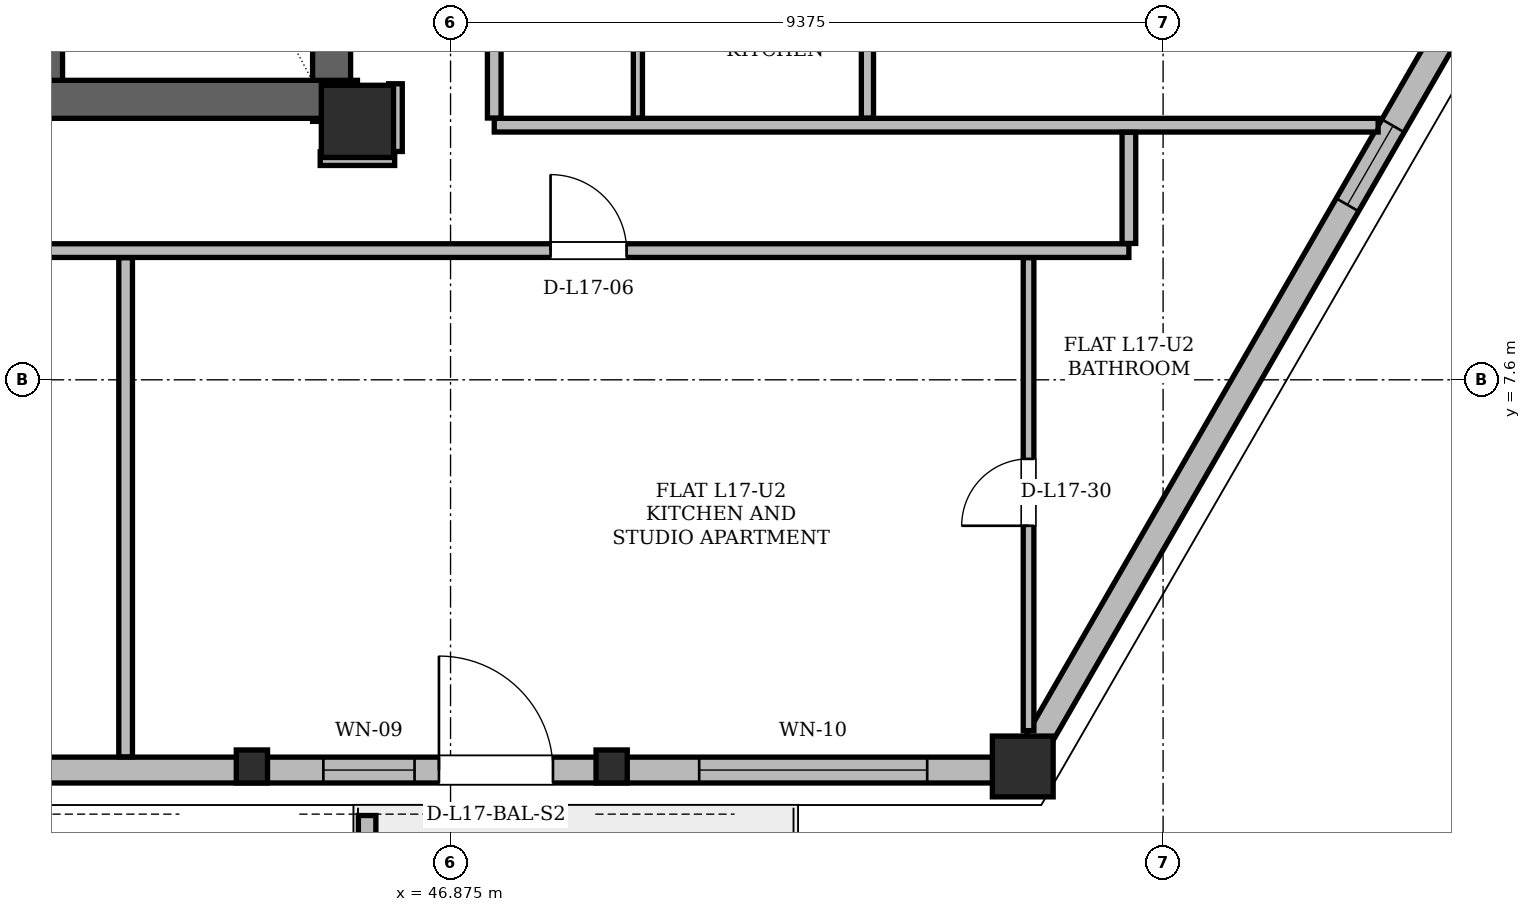
"""IFC4 building model, lengths in metres.
Left out: names, types, materials, properties, quantities, classifications, styles, units other than length and angle.
Written with IfcOpenShell. Run it as: python <this file> out.ifc"""

import sys

from ifc_helpers import new_model, si_unit, direction, frame, frame_2d, origin, origin_2d, place, context, subcontext, project, spatial, polyline, rectangle, hollow_rectangle, i_section, outline, extrude, element, fill, save


model = new_model("IFC4")
c1 = context("Model", 3, precision=1e-05, world=origin(), true_north=direction((0.0, 1.0)))
c2 = subcontext(c1, "Body", "Model", "MODEL_VIEW")
j1 = project(units=[si_unit("LENGTHUNIT", "METRE"), si_unit("PLANEANGLEUNIT", "RADIAN")], contexts=[c1])
p1 = place(None, origin())
s1 = spatial("IfcSite", under=j1, at=p1, CompositionType="ELEMENT")
p2 = place(p1, origin())
s2 = spatial("IfcBuilding", under=s1, at=p2, CompositionType="ELEMENT")
p3 = place(p2, frame((0.0, 0.0, 66.9)))
s3 = spatial("IfcBuildingStorey", under=s2, at=p3, CompositionType="ELEMENT", Elevation=66.9)
p4 = place(p3, frame((45.65, 11.0, 0.0), z_axis=(0.0, 0.0, 1.0), x_axis=(1.0, 0.0, 0.0)))
e1 = element("IfcColumn", 1, at=p4, inside=s3, PredefinedType="COLUMN", context=c2, shape_type="SweptSolid", body=[
    extrude(hollow_rectangle(XDim=0.95, YDim=0.95, WallThickness=0.08, at=origin_2d()), origin(), (0.0, 0.0, 1.0), 3.6),
])
p5 = place(p3, frame((54.382, 2.466, 0.005), z_axis=(0.01223223513, 0.026367262391, 0.999577480688), x_axis=(-0.907136496953, 0.420836519205, 0.0)))
e2 = element("IfcColumn", 2, at=p5, inside=s3, PredefinedType="COLUMN", context=c2, shape_type="SweptSolid", body=[
    extrude(hollow_rectangle(XDim=0.8, YDim=0.8, WallThickness=0.065, at=origin_2d()), origin(), (0.0, 0.0, 1.0), 3.593),
])
p6 = place(p3, frame((44.253, 2.466, 0.005), z_axis=(0.004893201568, 0.02636891956, 0.999640303639), x_axis=(-0.983214721584, 0.182452216376, 0.0)))
e3 = element("IfcColumn", 3, at=p6, inside=s3, PredefinedType="COLUMN", context=c2, shape_type="SweptSolid", body=[
    extrude(i_section(OverallWidth=0.411, OverallDepth=0.434, WebThickness=0.036, FlangeThickness=0.057, at=origin_2d()), origin(), (0.0, 0.0, 1.0), 3.592),
])
p7 = place(p3, frame((48.979, 2.466, 0.005), z_axis=(0.008359027369, 0.026368313978, 0.999617346128), x_axis=(-0.953247900316, 0.302189411698, 0.0)))
e4 = element("IfcColumn", 4, at=p7, inside=s3, PredefinedType="COLUMN", context=c2, shape_type="SweptSolid", body=[
    extrude(i_section(OverallWidth=0.411, OverallDepth=0.434, WebThickness=0.036, FlangeThickness=0.057, at=origin_2d()), origin(), (0.0, 0.0, 1.0), 3.593),
])
p8 = place(p3, frame((45.31, 11.0, 0.0), z_axis=(0.0, 0.0, 1.0), x_axis=(0.0, 1.0, 0.0)))
e5 = element("IfcWall", 5, at=p8, inside=s3, PredefinedType="SHEAR", context=c2, shape_type="SweptSolid", body=[
    extrude(rectangle(XDim=13.3, YDim=0.5, at=frame_2d((6.65, 0.0))), origin(), (0.0, 0.0, 1.0), 3.36),
])
p9 = place(p3, frame((38.55, 11.29, 0.0), z_axis=(0.0, 0.0, 1.0), x_axis=(1.0, 0.0, 0.0)))
e6 = element("IfcWall", 6, at=p9, inside=s3, PredefinedType="SHEAR", context=c2, shape_type="SweptSolid", body=[
    extrude(rectangle(XDim=7.1, YDim=0.5, at=frame_2d((3.55, 0.0))), origin(), (0.0, 0.0, 1.0), 3.36),
])
p10 = place(p3, frame((41.62, 11.54, 0.0), z_axis=(0.0, 0.0, 1.0), x_axis=(0.0, 1.0, 0.0)))
e7 = element("IfcWall", 7, at=p10, inside=s3, PredefinedType="SHEAR", context=c2, shape_type="SweptSolid", body=[
    extrude(rectangle(XDim=7.62, YDim=0.3, at=frame_2d((3.81, 0.0))), origin(), (0.0, 0.0, 1.0), 3.36),
])
p11 = place(p3, frame((20.618, 2.466, 0.0), z_axis=(0.0, 0.0, 1.0), x_axis=(1.0, 0.0, 0.0)))
e8 = element("IfcWall", 8, at=p11, inside=s3, PredefinedType="SOLIDWALL", context=c2, shape_type="SweptSolid", body=[
    extrude(rectangle(XDim=33.764, YDim=0.34, at=frame_2d((16.882, 0.0))), origin(), (0.0, 0.0, 1.0), 2.494),
])
p12 = place(p11, frame((7.824, 0.0, 0.0)))
e9 = element("IfcOpeningElement", 9, at=p12, cuts=e8, PredefinedType="OPENING", context=c2, shape_type="SweptSolid", body=[
    extrude(rectangle(XDim=1.5, YDim=2.2, at=frame_2d((0.75, 1.1))), frame((0.0, 0.17, 0.0), z_axis=(0.0, -1.0, 0.0), x_axis=(1.0, 0.0, 0.0)), (0.0, 0.0, 1.0), 0.34),
])
p13 = place(p11, frame((26.104, 0.0, 0.0)))
e10 = element("IfcOpeningElement", 10, at=p13, cuts=e8, PredefinedType="OPENING", context=c2, shape_type="SweptSolid", body=[
    extrude(rectangle(XDim=1.5, YDim=2.2, at=frame_2d((0.75, 1.1))), frame((0.0, 0.17, 0.0), z_axis=(0.0, -1.0, 0.0), x_axis=(1.0, 0.0, 0.0)), (0.0, 0.0, 1.0), 0.34),
])
p14 = place(p11, frame((11.402, 0.0, 0.85)))
e11 = element("IfcOpeningElement", 11, at=p14, cuts=e8, PredefinedType="OPENING", context=c2, shape_type="SweptSolid", body=[
    extrude(rectangle(XDim=2.0, YDim=1.534, at=frame_2d((1.0, 0.767))), frame((0.0, 0.17, 0.0), z_axis=(0.0, -1.0, 0.0), x_axis=(1.0, 0.0, 0.0)), (0.0, 0.0, 1.0), 0.34),
])
p15 = place(p11, frame((19.123, 0.0, 0.85)))
e12 = element("IfcOpeningElement", 12, at=p15, cuts=e8, PredefinedType="OPENING", context=c2, shape_type="SweptSolid", body=[
    extrude(rectangle(XDim=1.4, YDim=1.534, at=frame_2d((0.7, 0.767))), frame((0.0, 0.17, 0.0), z_axis=(0.0, -1.0, 0.0), x_axis=(1.0, 0.0, 0.0)), (0.0, 0.0, 1.0), 0.34),
])
p16 = place(p11, frame((24.583, 0.0, 0.85)))
e13 = element("IfcOpeningElement", 13, at=p16, cuts=e8, PredefinedType="OPENING", context=c2, shape_type="SweptSolid", body=[
    extrude(rectangle(XDim=1.2, YDim=1.48, at=frame_2d((0.6, 0.74))), frame((0.0, 0.17, 0.0), z_axis=(0.0, -1.0, 0.0), x_axis=(1.0, 0.0, 0.0)), (0.0, 0.0, 1.0), 0.34),
])
p17 = place(p11, frame((29.528, 0.0, 0.85)))
e14 = element("IfcOpeningElement", 14, at=p17, cuts=e8, PredefinedType="OPENING", context=c2, shape_type="SweptSolid", body=[
    extrude(rectangle(XDim=3.0, YDim=1.534, at=frame_2d((1.5, 0.767))), frame((0.0, 0.17, 0.0), z_axis=(0.0, -1.0, 0.0), x_axis=(1.0, 0.0, 0.0)), (0.0, 0.0, 1.0), 0.34),
])
p18 = place(p11, frame((0.989, 0.0, 0.85)))
e15 = element("IfcOpeningElement", 15, at=p18, cuts=e8, PredefinedType="OPENING", context=c2, shape_type="SweptSolid", body=[
    extrude(rectangle(XDim=1.2, YDim=1.48, at=frame_2d((0.6, 0.74))), frame((0.0, 0.17, 0.0), z_axis=(0.0, -1.0, 0.0), x_axis=(1.0, 0.0, 0.0)), (0.0, 0.0, 1.0), 0.34),
])
p19 = place(p11, frame((3.417, 0.0, 0.85)))
e16 = element("IfcOpeningElement", 16, at=p19, cuts=e8, PredefinedType="OPENING", context=c2, shape_type="SweptSolid", body=[
    extrude(rectangle(XDim=1.2, YDim=1.48, at=frame_2d((0.6, 0.74))), frame((0.0, 0.17, 0.0), z_axis=(0.0, -1.0, 0.0), x_axis=(1.0, 0.0, 0.0)), (0.0, 0.0, 1.0), 0.34),
])
p20 = place(p3, frame((54.382, 2.466, 0.0), z_axis=(0.0, 0.0, 1.0), x_axis=(0.499986980295, 0.866032920584, 0.0)))
e17 = element("IfcWall", 17, at=p20, inside=s3, PredefinedType="SOLIDWALL", context=c2, shape_type="SweptSolid", body=[
    extrude(rectangle(XDim=13.661, YDim=0.34, at=frame_2d((6.831, 0.0))), origin(), (0.0, 0.0, 1.0), 2.494),
])
p21 = place(p20, frame((8.587, 0.0, 0.85)))
e18 = element("IfcOpeningElement", 18, at=p21, cuts=e17, PredefinedType="OPENING", context=c2, shape_type="SweptSolid", body=[
    extrude(rectangle(XDim=1.2, YDim=1.48, at=frame_2d((0.6, 0.74))), frame((0.0, 0.17, 0.0), z_axis=(0.0, -1.0, 0.0), x_axis=(1.0, 0.0, 0.0)), (0.0, 0.0, 1.0), 0.34),
])
p22 = place(p3, frame((45.777, 1.868, 0.0), z_axis=(0.0, 0.0, 1.0), x_axis=(0.0, -1.0, 0.0)))
e19 = element("IfcWall", 19, at=p22, inside=s3, PredefinedType="PARAPET", context=c2, shape_type="SweptSolid", body=[
    extrude(outline(polyline([(0.0, 0.0), (2.042, 0.0), (2.042, 1.1), (0.0, 1.32), (0.0, 0.0)])), frame((0.0, 0.115, 0.0), z_axis=(0.0, -1.0, 0.0), x_axis=(1.0, 0.0, 0.0)), (0.0, 0.0, 1.0), 0.23),
])
p23 = place(p3, frame((19.2, 9.3, 0.0), z_axis=(0.0, 0.0, 1.0), x_axis=(1.0, 0.0, 0.0)))
e20 = element("IfcWall", 20, at=p23, inside=s3, PredefinedType="PARTITIONING", context=c2, shape_type="SweptSolid", body=[
    extrude(rectangle(XDim=36.6, YDim=0.18, at=frame_2d((18.3, 0.0))), origin(), (0.0, 0.0, 1.0), 2.738),
])
p24 = place(p23, frame((3.844, 0.0, 0.0)))
e21 = element("IfcOpeningElement", 21, at=p24, cuts=e20, PredefinedType="OPENING", context=c2, shape_type="SweptSolid", body=[
    extrude(rectangle(XDim=1.0, YDim=2.18, at=frame_2d((0.5, 1.09))), frame((0.0, 0.09, 0.0), z_axis=(0.0, -1.0, 0.0), x_axis=(1.0, 0.0, 0.0)), (0.0, 0.0, 1.0), 0.18),
])
p25 = place(p23, frame((17.699, 0.0, 0.0)))
e22 = element("IfcOpeningElement", 22, at=p25, cuts=e20, PredefinedType="OPENING", context=c2, shape_type="SweptSolid", body=[
    extrude(rectangle(XDim=1.0, YDim=2.18, at=frame_2d((0.5, 1.09))), frame((0.0, 0.09, 0.0), z_axis=(0.0, -1.0, 0.0), x_axis=(1.0, 0.0, 0.0)), (0.0, 0.0, 1.0), 0.18),
])
p26 = place(p23, frame((28.991, 0.0, 0.0)))
e23 = element("IfcOpeningElement", 23, at=p26, cuts=e20, PredefinedType="OPENING", context=c2, shape_type="SweptSolid", body=[
    extrude(rectangle(XDim=1.0, YDim=2.18, at=frame_2d((0.5, 1.09))), frame((0.0, 0.09, 0.0), z_axis=(0.0, -1.0, 0.0), x_axis=(1.0, 0.0, 0.0)), (0.0, 0.0, 1.0), 0.18),
])
p27 = place(p3, frame((45.16, 10.51, 0.0), z_axis=(0.0, 0.0, 1.0), x_axis=(1.0, 0.0, 0.0)))
e24 = element("IfcWall", 24, at=p27, inside=s3, PredefinedType="PARTITIONING", context=c2, shape_type="SweptSolid", body=[
    extrude(rectangle(XDim=0.98, YDim=0.18, at=frame_2d((0.49, 0.0))), origin(), (0.0, 0.0, 1.0), 2.738),
])
p28 = place(p3, frame((47.45, 10.95, 0.0), z_axis=(0.0, 0.0, 1.0), x_axis=(1.0, 0.0, 0.0)))
e25 = element("IfcWall", 25, at=p28, inside=s3, PredefinedType="PARTITIONING", context=c2, shape_type="SweptSolid", body=[
    extrude(rectangle(XDim=11.629, YDim=0.18, at=frame_2d((5.814, 0.0))), origin(), (0.0, 0.0, 1.0), 3.36),
])
p29 = place(p3, frame((42.6, 2.64, 0.0), z_axis=(0.0, 0.0, 1.0), x_axis=(0.0, 1.0, 0.0)))
e26 = element("IfcWall", 26, at=p29, inside=s3, PredefinedType="PARTITIONING", context=c2, shape_type="SweptSolid", body=[
    extrude(rectangle(XDim=6.566, YDim=0.18, at=frame_2d((3.283, 0.0))), origin(), (0.0, 0.0, 1.0), 2.946),
])
p30 = place(p3, frame((46.15, 10.604, 0.0), z_axis=(0.0, 0.0, 1.0), x_axis=(0.0, 1.0, 0.0)))
e27 = element("IfcWall", 27, at=p30, inside=s3, PredefinedType="PARTITIONING", context=c2, shape_type="SweptSolid", body=[
    extrude(rectangle(XDim=0.891, YDim=0.18, at=frame_2d((0.446, 0.0))), origin(), (0.0, 0.0, 1.0), 2.738),
])
p31 = place(p3, frame((47.45, 11.044, 0.0), z_axis=(0.0, 0.0, 1.0), x_axis=(0.0, 1.0, 0.0)))
e28 = element("IfcWall", 28, at=p31, inside=s3, PredefinedType="PARTITIONING", context=c2, shape_type="SweptSolid", body=[
    extrude(rectangle(XDim=14.832, YDim=0.18, at=frame_2d((7.416, 0.0))), origin(), (0.0, 0.0, 1.0), 2.738),
])
p32 = place(p31, frame((6.079, 0.0, 0.0)))
e29 = element("IfcOpeningElement", 29, at=p32, cuts=e28, PredefinedType="OPENING", context=c2, shape_type="SweptSolid", body=[
    extrude(rectangle(XDim=1.0, YDim=2.18, at=frame_2d((0.5, 1.09))), frame((0.0, 0.09, 0.0), z_axis=(0.0, -1.0, 0.0), x_axis=(1.0, 0.0, 0.0)), (0.0, 0.0, 1.0), 0.18),
])
p33 = place(p31, frame((10.668, 0.0, 0.0)))
e30 = element("IfcOpeningElement", 30, at=p33, cuts=e28, PredefinedType="OPENING", context=c2, shape_type="SweptSolid", body=[
    extrude(rectangle(XDim=1.0, YDim=2.18, at=frame_2d((0.5, 1.09))), frame((0.0, 0.09, 0.0), z_axis=(0.0, -1.0, 0.0), x_axis=(1.0, 0.0, 0.0)), (0.0, 0.0, 1.0), 0.18),
])
p34 = place(p3, frame((49.34, 11.044, 0.0), z_axis=(0.0, 0.0, 1.0), x_axis=(0.0, 1.0, 0.0)))
e31 = element("IfcWall", 31, at=p34, inside=s3, PredefinedType="PARTITIONING", context=c2, shape_type="SweptSolid", body=[
    extrude(rectangle(XDim=3.102, YDim=0.12, at=frame_2d((1.551, 0.0))), origin(), (0.0, 0.0, 1.0), 2.738),
])
p35 = place(p3, frame((52.36, 11.044, 0.0), z_axis=(0.0, 0.0, 1.0), x_axis=(0.0, 1.0, 0.0)))
e32 = element("IfcWall", 32, at=p35, inside=s3, PredefinedType="PARTITIONING", context=c2, shape_type="SweptSolid", body=[
    extrude(rectangle(XDim=3.102, YDim=0.16, at=frame_2d((1.551, 0.0))), origin(), (0.0, 0.0, 1.0), 2.738),
])
p36 = place(p3, frame((54.48, 2.984, 0.0), z_axis=(0.0, 0.0, 1.0), x_axis=(0.0, 1.0, 0.0)))
e33 = element("IfcWall", 33, at=p36, inside=s3, PredefinedType="PARTITIONING", context=c2, shape_type="SweptSolid", body=[
    extrude(rectangle(XDim=6.222, YDim=0.14, at=frame_2d((3.111, 0.0))), origin(), (0.0, 0.0, 1.0), 3.36),
])
p37 = place(p36, frame((2.696, 0.0, 0.0)))
e34 = element("IfcOpeningElement", 34, at=p37, cuts=e33, PredefinedType="OPENING", context=c2, shape_type="SweptSolid", body=[
    extrude(rectangle(XDim=0.88, YDim=2.08, at=frame_2d((0.44, 1.04))), frame((0.0, 0.07, 0.0), z_axis=(0.0, -1.0, 0.0), x_axis=(1.0, 0.0, 0.0)), (0.0, 0.0, 1.0), 0.14),
])
p38 = place(p3, frame((55.8, 9.394, 0.0), z_axis=(0.0, 0.0, 1.0), x_axis=(0.0, 1.0, 0.0)))
e35 = element("IfcWall", 35, at=p38, inside=s3, PredefinedType="PARTITIONING", context=c2, shape_type="SweptSolid", body=[
    extrude(rectangle(XDim=1.462, YDim=0.18, at=frame_2d((0.731, 0.0))), origin(), (0.0, 0.0, 1.0), 3.36),
])
p39 = place(p13, origin())
e36 = element("IfcDoor", 36, at=p39, inside=s3, OperationType="SINGLE_SWING_LEFT", PredefinedType="DOOR", context=c2, shape_type="SweptSolid", body=[
    extrude(rectangle(XDim=1.5, YDim=2.2, at=frame_2d((0.75, 1.1))), frame((0.0, 0.025, 0.0), z_axis=(0.0, -1.0, 0.0), x_axis=(1.0, 0.0, 0.0)), (0.0, 0.0, 1.0), 0.05),
])
fill(e10, e36)
p40 = place(p16, origin())
e37 = element("IfcWindow", 37, at=p40, inside=s3, PartitioningType="SINGLE_PANEL", PredefinedType="WINDOW", context=c2, shape_type="SweptSolid", body=[
    extrude(rectangle(XDim=1.2, YDim=1.48, at=frame_2d((0.6, 0.74))), frame((0.0, 0.03, 0.0), z_axis=(0.0, -1.0, 0.0), x_axis=(1.0, 0.0, 0.0)), (0.0, 0.0, 1.0), 0.06),
])
fill(e13, e37)
p41 = place(p17, origin())
e38 = element("IfcWindow", 38, at=p41, inside=s3, PartitioningType="SINGLE_PANEL", PredefinedType="WINDOW", context=c2, shape_type="SweptSolid", body=[
    extrude(rectangle(XDim=3.0, YDim=1.534, at=frame_2d((1.5, 0.767))), frame((0.0, 0.03, 0.0), z_axis=(0.0, -1.0, 0.0), x_axis=(1.0, 0.0, 0.0)), (0.0, 0.0, 1.0), 0.06),
])
fill(e14, e38)
p42 = place(p21, origin())
e39 = element("IfcWindow", 39, at=p42, inside=s3, PartitioningType="SINGLE_PANEL", PredefinedType="WINDOW", context=c2, shape_type="SweptSolid", body=[
    extrude(rectangle(XDim=1.2, YDim=1.48, at=frame_2d((0.6, 0.74))), frame((0.0, 0.03, 0.0), z_axis=(0.0, -1.0, 0.0), x_axis=(1.0, 0.0, 0.0)), (0.0, 0.0, 1.0), 0.06),
])
fill(e18, e39)
p43 = place(p26, origin())
e40 = element("IfcDoor", 40, at=p43, inside=s3, OperationType="SINGLE_SWING_LEFT", PredefinedType="DOOR", context=c2, shape_type="SweptSolid", body=[
    extrude(rectangle(XDim=1.0, YDim=2.18, at=frame_2d((0.5, 1.09))), frame((0.0, 0.025, 0.0), z_axis=(0.0, -1.0, 0.0), x_axis=(1.0, 0.0, 0.0)), (0.0, 0.0, 1.0), 0.05),
])
fill(e23, e40)
p44 = place(p37, origin())
e41 = element("IfcDoor", 41, at=p44, inside=s3, OperationType="SINGLE_SWING_LEFT", PredefinedType="DOOR", context=c2, shape_type="SweptSolid", body=[
    extrude(rectangle(XDim=0.88, YDim=2.08, at=frame_2d((0.44, 1.04))), frame((0.0, 0.025, 0.0), z_axis=(0.0, -1.0, 0.0), x_axis=(1.0, 0.0, 0.0)), (0.0, 0.0, 1.0), 0.05),
])
fill(e34, e41)
save(model, sys.argv[1])
